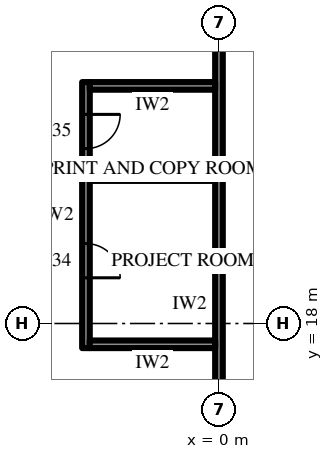
"""IFC4 building model, lengths in metres.
Left out: names, types, materials, properties, quantities, classifications, styles, units other than length and angle.
Written with IfcOpenShell. Run it as: python <this file> out.ifc"""

import sys

from ifc_helpers import new_model, si_unit, direction, frame, frame_2d, origin, place, context, subcontext, project, spatial, rectangle, extrude, element, fill, save


model = new_model("IFC4")
c1 = context("Model", 3, precision=1e-05, world=origin(), true_north=direction((0.0, 1.0)))
c2 = subcontext(c1, "Body", "Model", "MODEL_VIEW")
j1 = project(units=[si_unit("LENGTHUNIT", "METRE"), si_unit("PLANEANGLEUNIT", "RADIAN")], contexts=[c1])
p1 = place(None, origin())
s1 = spatial("IfcSite", under=j1, at=p1, CompositionType="ELEMENT")
p2 = place(p1, origin())
s2 = spatial("IfcBuilding", under=s1, at=p2, CompositionType="ELEMENT")
p3 = place(p2, frame((0.0, 0.0, 257.5)))
s3 = spatial("IfcBuildingStorey", under=s2, at=p3, CompositionType="ELEMENT", Elevation=257.5)
p4 = place(p3, frame((0.0, 12.3, 0.0), z_axis=(0.0, 0.0, 1.0), x_axis=(0.0, 1.0, 0.0)))
e1 = element("IfcWall", 1, at=p4, inside=s3, PredefinedType="PARTITIONING", context=c2, shape_type="SweptSolid", body=[
    extrude(rectangle(XDim=15.55, YDim=0.2, at=frame_2d((7.775, 0.0))), origin(), (0.0, 0.0, 1.0), 2.992),
])
p5 = place(p4, frame((1.055, 0.0, 0.0)))
e2 = element("IfcOpeningElement", 2, at=p5, cuts=e1, PredefinedType="OPENING", context=c2, shape_type="SweptSolid", body=[
    extrude(rectangle(XDim=1.0, YDim=2.2, at=frame_2d((0.5, 1.1))), frame((0.0, 0.11, 0.0), z_axis=(0.0, -1.0, 0.0), x_axis=(1.0, 0.0, 0.0)), (0.0, 0.0, 1.0), 0.22),
])
p6 = place(p3, frame((-3.5, 17.353, 0.0), z_axis=(0.0, 0.0, 1.0), x_axis=(0.0, 1.0, 0.0)))
e3 = element("IfcWall", 3, at=p6, inside=s3, PredefinedType="PARTITIONING", context=c2, shape_type="SweptSolid", body=[
    extrude(rectangle(XDim=7.0, YDim=0.2, at=frame_2d((3.5, 0.0))), origin(), (0.0, 0.0, 1.0), 4.0),
])
p7 = place(p6, frame((1.85, 0.0, 0.0)))
e4 = element("IfcOpeningElement", 4, at=p7, cuts=e3, PredefinedType="OPENING", context=c2, shape_type="SweptSolid", body=[
    extrude(rectangle(XDim=0.9, YDim=2.2, at=frame_2d((0.45, 1.1))), frame((0.0, 0.11, 0.0), z_axis=(0.0, -1.0, 0.0), x_axis=(1.0, 0.0, 0.0)), (0.0, 0.0, 1.0), 0.22),
])
p8 = place(p6, frame((5.25, 0.0, 0.0)))
e5 = element("IfcOpeningElement", 5, at=p8, cuts=e3, PredefinedType="OPENING", context=c2, shape_type="SweptSolid", body=[
    extrude(rectangle(XDim=0.9, YDim=2.2, at=frame_2d((0.45, 1.1))), frame((0.0, 0.11, 0.0), z_axis=(0.0, -1.0, 0.0), x_axis=(1.0, 0.0, 0.0)), (0.0, 0.0, 1.0), 0.22),
])
for number, where, z_axis, x_axis in (
    (6, (-0.1, 17.452, 0.0), (0.0, 0.0, 1.0), (-1.0, 0.0, 0.0)),
    (7, (-0.1, 21.853, 0.0), (0.0, 0.0, 1.0), (-1.0, 0.0, 0.0)),
    (8, (-0.1, 24.252, 0.0), (0.0, 0.0, 1.0), (-1.0, 0.0, 0.0)),
):
    element("IfcWall", number, at=place(p3, frame(where, z_axis=z_axis, x_axis=x_axis)), inside=s3, PredefinedType="PARTITIONING", context=c2, shape_type="SweptSolid", body=[
        extrude(rectangle(XDim=3.3, YDim=0.2, at=frame_2d((1.65, 0.0))), origin(), (0.0, 0.0, 1.0), 4.0),
    ])
p9 = place(p7, frame((0.9, 0.0, 0.0), z_axis=(0.0, 0.0, 1.0), x_axis=(-1.0, 0.0, 0.0)))
e9 = element("IfcDoor", 9, at=p9, inside=s3, OperationType="SINGLE_SWING_LEFT", PredefinedType="DOOR", context=c2, shape_type="SweptSolid", body=[
    extrude(rectangle(XDim=0.9, YDim=2.2, at=frame_2d((0.45, 1.1))), frame((0.0, 0.025, 0.0), z_axis=(0.0, -1.0, 0.0), x_axis=(1.0, 0.0, 0.0)), (0.0, 0.0, 1.0), 0.05),
])
fill(e4, e9)
p10 = place(p8, frame((0.9, 0.0, 0.0), z_axis=(0.0, 0.0, 1.0), x_axis=(-1.0, 0.0, 0.0)))
e10 = element("IfcDoor", 10, at=p10, inside=s3, OperationType="SINGLE_SWING_RIGHT", PredefinedType="DOOR", context=c2, shape_type="SweptSolid", body=[
    extrude(rectangle(XDim=0.9, YDim=2.2, at=frame_2d((0.45, 1.1))), frame((0.0, 0.025, 0.0), z_axis=(0.0, -1.0, 0.0), x_axis=(1.0, 0.0, 0.0)), (0.0, 0.0, 1.0), 0.05),
])
fill(e5, e10)
save(model, sys.argv[1])
